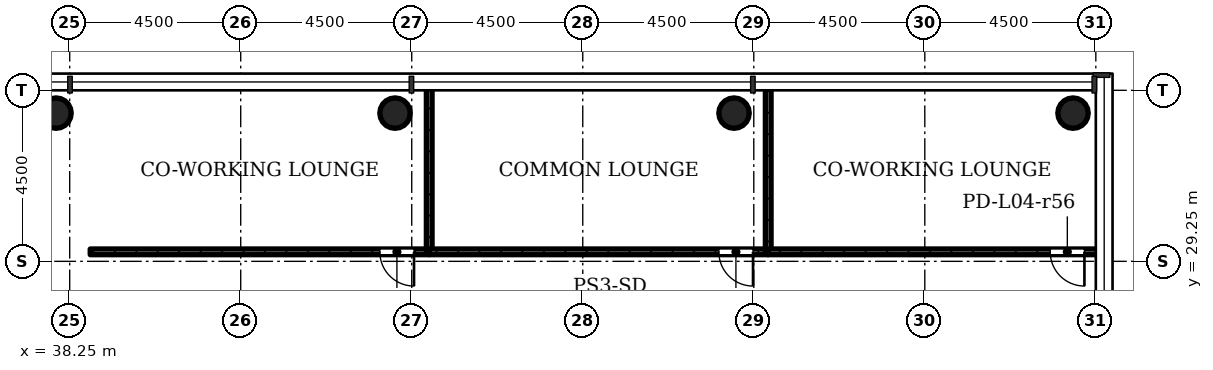
"""IFC4 building model, lengths in metres.
Left out: names, types, materials, properties, quantities, classifications, styles, units other than length and angle.
Written with IfcOpenShell. Run it as: python <this file> out.ifc"""

import sys

from ifc_helpers import new_model, si_unit, direction, frame, frame_2d, origin, origin_2d, place, context, subcontext, project, spatial, rectangle, hollow_circle, extrude, element, fill, save


model = new_model("IFC4")
c1 = context("Model", 3, precision=1e-05, world=origin(), true_north=direction((0.0, 1.0)))
c2 = subcontext(c1, "Body", "Model", "MODEL_VIEW")
j1 = project(units=[si_unit("LENGTHUNIT", "METRE"), si_unit("PLANEANGLEUNIT", "RADIAN")], contexts=[c1])
p1 = place(None, origin())
s1 = spatial("IfcSite", under=j1, at=p1, CompositionType="ELEMENT")
p2 = place(p1, origin())
s2 = spatial("IfcBuilding", under=s1, at=p2, CompositionType="ELEMENT")
p3 = place(p2, frame((0.0, 0.0, 20.0)))
s3 = spatial("IfcBuildingStorey", under=s2, at=p3, CompositionType="ELEMENT", Elevation=20.0)
for number, where, z_axis, x_axis in (
    (1, (37.89, 33.15, 0.0), (0.0, 0.0, 1.0), (1.0, 0.0, 0.0)),
    (2, (46.81, 33.15, 0.0), (0.0, 0.0, 1.0), (1.0, 0.0, 0.0)),
    (3, (55.73, 33.15, 0.0), (0.0, 0.0, 1.0), (1.0, 0.0, 0.0)),
    (4, (64.65, 33.15, 0.0), (0.0, 0.0, 1.0), (1.0, 0.0, 0.0)),
):
    element("IfcColumn", number, at=place(p3, frame(where, z_axis=z_axis, x_axis=x_axis)), inside=s3, PredefinedType="COLUMN", context=c2, shape_type="SweptSolid", body=[
        extrude(hollow_circle(Radius=0.4, WallThickness=0.028, at=origin_2d()), origin(), (0.0, 0.0, 1.0), 4.08),
    ])
p4 = place(p3, frame((47.71, 29.5, 0.0), z_axis=(0.0, 0.0, 1.0), x_axis=(-1.0, 0.0, 0.0)))
e5 = element("IfcWall", 5, at=p4, inside=s3, PredefinedType="PARTITIONING", context=c2, shape_type="SweptSolid", body=[
    extrude(rectangle(XDim=8.92, YDim=0.15, at=frame_2d((4.46, 0.0))), origin(), (0.0, 0.0, 1.0), 4.075),
])
p5 = place(p4, frame((0.4, 0.0, 0.0)))
e6 = element("IfcOpeningElement", 6, at=p5, cuts=e5, PredefinedType="OPENING", context=c2, shape_type="SweptSolid", body=[
    extrude(rectangle(XDim=0.9, YDim=2.1, at=frame_2d((0.45, 1.05))), frame((0.0, 0.085, 0.0), z_axis=(0.0, -1.0, 0.0), x_axis=(1.0, 0.0, 0.0)), (0.0, 0.0, 1.0), 0.17),
])
p6 = place(p3, frame((47.71, 33.85, 0.0), z_axis=(0.0, 0.0, 1.0), x_axis=(0.0, -1.0, 0.0)))
e7 = element("IfcWall", 7, at=p6, inside=s3, PredefinedType="PARTITIONING", context=c2, shape_type="SweptSolid", body=[
    extrude(rectangle(XDim=4.35, YDim=0.15, at=frame_2d((2.175, 0.0))), origin(), (0.0, 0.0, 1.0), 4.075),
])
p7 = place(p3, frame((56.63, 29.5, 0.0), z_axis=(0.0, 0.0, 1.0), x_axis=(-1.0, 0.0, 0.0)))
e8 = element("IfcWall", 8, at=p7, inside=s3, PredefinedType="PARTITIONING", context=c2, shape_type="SweptSolid", body=[
    extrude(rectangle(XDim=8.92, YDim=0.15, at=frame_2d((4.46, 0.0))), origin(), (0.0, 0.0, 1.0), 4.075),
])
p8 = place(p7, frame((0.4, 0.0, 0.0)))
e9 = element("IfcOpeningElement", 9, at=p8, cuts=e8, PredefinedType="OPENING", context=c2, shape_type="SweptSolid", body=[
    extrude(rectangle(XDim=0.9, YDim=2.1, at=frame_2d((0.45, 1.05))), frame((0.0, 0.085, 0.0), z_axis=(0.0, -1.0, 0.0), x_axis=(1.0, 0.0, 0.0)), (0.0, 0.0, 1.0), 0.17),
])
p9 = place(p3, frame((56.63, 33.85, 0.0), z_axis=(0.0, 0.0, 1.0), x_axis=(0.0, -1.0, 0.0)))
e10 = element("IfcWall", 10, at=p9, inside=s3, PredefinedType="PARTITIONING", context=c2, shape_type="SweptSolid", body=[
    extrude(rectangle(XDim=4.35, YDim=0.15, at=frame_2d((2.175, 0.0))), origin(), (0.0, 0.0, 1.0), 4.075),
])
p10 = place(p3, frame((65.35, 29.5, 0.0), z_axis=(0.0, 0.0, 1.0), x_axis=(-1.0, 0.0, 0.0)))
e11 = element("IfcWall", 11, at=p10, inside=s3, PredefinedType="PARTITIONING", context=c2, shape_type="SweptSolid", body=[
    extrude(rectangle(XDim=8.72, YDim=0.15, at=frame_2d((4.36, 0.0))), origin(), (0.0, 0.0, 1.0), 4.075),
])
p11 = place(p10, frame((0.4, 0.0, 0.0)))
e12 = element("IfcOpeningElement", 12, at=p11, cuts=e11, PredefinedType="OPENING", context=c2, shape_type="SweptSolid", body=[
    extrude(rectangle(XDim=0.9, YDim=2.1, at=frame_2d((0.45, 1.05))), frame((0.0, 0.085, 0.0), z_axis=(0.0, -1.0, 0.0), x_axis=(1.0, 0.0, 0.0)), (0.0, 0.0, 1.0), 0.17),
])
p12 = place(p5, origin())
e13 = element("IfcDoor", 13, at=p12, inside=s3, OperationType="SINGLE_SWING_RIGHT", PredefinedType="DOOR", context=c2, shape_type="SweptSolid", body=[
    extrude(rectangle(XDim=0.9, YDim=2.1, at=frame_2d((0.45, 1.05))), frame((0.0, 0.025, 0.0), z_axis=(0.0, -1.0, 0.0), x_axis=(1.0, 0.0, 0.0)), (0.0, 0.0, 1.0), 0.05),
])
fill(e6, e13)
p13 = place(p8, origin())
e14 = element("IfcDoor", 14, at=p13, inside=s3, OperationType="SINGLE_SWING_RIGHT", PredefinedType="DOOR", context=c2, shape_type="SweptSolid", body=[
    extrude(rectangle(XDim=0.9, YDim=2.1, at=frame_2d((0.45, 1.05))), frame((0.0, 0.025, 0.0), z_axis=(0.0, -1.0, 0.0), x_axis=(1.0, 0.0, 0.0)), (0.0, 0.0, 1.0), 0.05),
])
fill(e9, e14)
p14 = place(p11, origin())
e15 = element("IfcDoor", 15, at=p14, inside=s3, OperationType="SINGLE_SWING_RIGHT", PredefinedType="DOOR", context=c2, shape_type="SweptSolid", body=[
    extrude(rectangle(XDim=0.9, YDim=2.1, at=frame_2d((0.45, 1.05))), frame((0.0, 0.025, 0.0), z_axis=(0.0, -1.0, 0.0), x_axis=(1.0, 0.0, 0.0)), (0.0, 0.0, 1.0), 0.05),
])
fill(e12, e15)
save(model, sys.argv[1])
